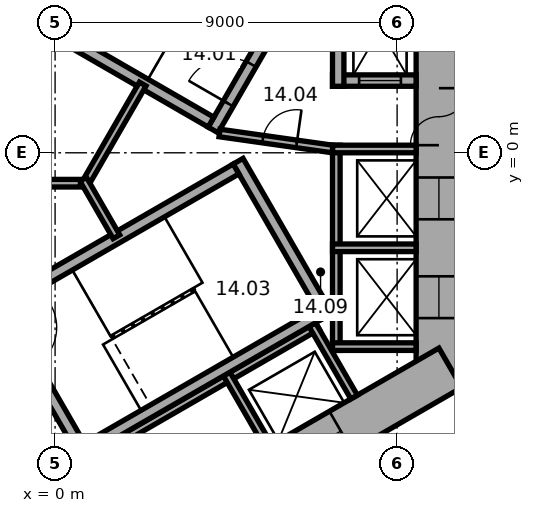
"""IFC4 building model, lengths in metres.
Left out: names, types, materials, properties, quantities, classifications, styles, units other than length and angle.
Written with IfcOpenShell. Run it as: python <this file> out.ifc"""

import sys

from ifc_helpers import new_model, si_unit, direction, frame, frame_2d, origin, place, context, subcontext, project, spatial, rectangle, extrude, element, fill, save


model = new_model("IFC4")
c1 = context("Model", 3, precision=1e-05, world=origin(), true_north=direction((0.0, 1.0)))
c2 = subcontext(c1, "Body", "Model", "MODEL_VIEW")
j1 = project(units=[si_unit("LENGTHUNIT", "METRE"), si_unit("PLANEANGLEUNIT", "RADIAN")], contexts=[c1])
p1 = place(None, origin())
s1 = spatial("IfcSite", under=j1, at=p1, CompositionType="ELEMENT")
p2 = place(p1, origin())
s2 = spatial("IfcBuilding", under=s1, at=p2, CompositionType="ELEMENT")
p3 = place(p2, frame((0.0, 0.0, 67.1)))
s3 = spatial("IfcBuildingStorey", under=s2, at=p3, CompositionType="ELEMENT", Elevation=67.1)
p4 = place(p3, frame((10.1, -6.177, 0.0), z_axis=(0.0, 0.0, 1.0), x_axis=(0.0, 1.0, 0.0)))
e1 = element("IfcWall", 1, at=p4, inside=s3, PredefinedType="SHEAR", context=c2, shape_type="SweptSolid", body=[
    extrude(rectangle(XDim=12.355, YDim=1.2, at=frame_2d((6.177, 0.0))), origin(), (0.0, 0.0, 1.0), 3.3),
])
p5 = place(p4, frame((6.378, 0.0, 0.0)))
e2 = element("IfcOpeningElement", 2, at=p5, cuts=e1, PredefinedType="OPENING", context=c2, shape_type="SweptSolid", body=[
    extrude(rectangle(XDim=1.5, YDim=2.1, at=frame_2d((0.75, 1.05))), frame((0.0, 0.61, 0.0), z_axis=(0.0, -1.0, 0.0), x_axis=(1.0, 0.0, 0.0)), (0.0, 0.0, 1.0), 1.22),
])
p6 = place(p4, frame((1.828, 0.0, 0.0)))
e3 = element("IfcOpeningElement", 3, at=p6, cuts=e1, PredefinedType="OPENING", context=c2, shape_type="SweptSolid", body=[
    extrude(rectangle(XDim=1.1, YDim=2.1, at=frame_2d((0.55, 1.05))), frame((0.0, 0.61, 0.0), z_axis=(0.0, -1.0, 0.0), x_axis=(1.0, 0.0, 0.0)), (0.0, 0.0, 1.0), 1.22),
])
p7 = place(p4, frame((4.427, 0.0, 0.0)))
e4 = element("IfcOpeningElement", 4, at=p7, cuts=e1, PredefinedType="OPENING", context=c2, shape_type="SweptSolid", body=[
    extrude(rectangle(XDim=1.1, YDim=2.1, at=frame_2d((0.55, 1.05))), frame((0.0, 0.61, 0.0), z_axis=(0.0, -1.0, 0.0), x_axis=(1.0, 0.0, 0.0)), (0.0, 0.0, 1.0), 1.22),
])
p8 = place(p3, frame((-10.4, -5.658, 0.0), z_axis=(0.0, 0.0, 1.0), x_axis=(0.866021384402, -0.500006961711, 0.0)))
e5 = element("IfcWall", 5, at=p8, inside=s3, PredefinedType="SHEAR", context=c2, shape_type="SweptSolid", body=[
    extrude(rectangle(XDim=12.355, YDim=1.2, at=frame_2d((6.178, 0.0))), origin(), (0.0, 0.0, 1.0), 3.3),
])
p9 = place(p8, frame((6.378, 0.0, 0.0)))
e6 = element("IfcOpeningElement", 6, at=p9, cuts=e5, PredefinedType="OPENING", context=c2, shape_type="SweptSolid", body=[
    extrude(rectangle(XDim=1.5, YDim=2.1, at=frame_2d((0.75, 1.05))), frame((0.0, 0.61, 0.0), z_axis=(0.0, -1.0, 0.0), x_axis=(1.0, 0.0, 0.0)), (0.0, 0.0, 1.0), 1.22),
])
p10 = place(p8, frame((3.228, 0.0, 0.0)))
e7 = element("IfcOpeningElement", 7, at=p10, cuts=e5, PredefinedType="OPENING", context=c2, shape_type="SweptSolid", body=[
    extrude(rectangle(XDim=0.9, YDim=2.1, at=frame_2d((0.45, 1.05))), frame((0.0, 0.61, 0.0), z_axis=(0.0, -1.0, 0.0), x_axis=(1.0, 0.0, 0.0)), (0.0, 0.0, 1.0), 1.22),
])
p11 = place(p3, frame((-0.3, -11.836, 0.0), z_axis=(0.0, 0.0, 1.0), x_axis=(0.866021384402, 0.500006961711, 0.0)))
e8 = element("IfcWall", 8, at=p11, inside=s3, PredefinedType="SHEAR", context=c2, shape_type="SweptSolid", body=[
    extrude(rectangle(XDim=12.355, YDim=1.2, at=frame_2d((6.178, 0.0))), origin(), (0.0, 0.0, 1.0), 3.3),
])
p12 = place(p11, frame((4.128, 0.0, 0.0)))
e9 = element("IfcOpeningElement", 9, at=p12, cuts=e8, PredefinedType="OPENING", context=c2, shape_type="SweptSolid", body=[
    extrude(rectangle(XDim=0.9, YDim=2.1, at=frame_2d((0.45, 1.05))), frame((0.0, 0.61, 0.0), z_axis=(0.0, -1.0, 0.0), x_axis=(1.0, 0.0, 0.0)), (0.0, 0.0, 1.0), 1.22),
])
p13 = place(p11, frame((7.928, 0.0, 0.0)))
e10 = element("IfcOpeningElement", 10, at=p13, cuts=e8, PredefinedType="OPENING", context=c2, shape_type="SweptSolid", body=[
    extrude(rectangle(XDim=1.1, YDim=2.1, at=frame_2d((0.55, 1.05))), frame((0.0, 0.61, 0.0), z_axis=(0.0, -1.0, 0.0), x_axis=(1.0, 0.0, 0.0)), (0.0, 0.0, 1.0), 1.22),
])
p14 = place(p3, frame((7.4, -5.2, 0.0), z_axis=(0.0, 0.0, 1.0), x_axis=(0.0, 1.0, 0.0)))
e11 = element("IfcWall", 11, at=p14, inside=s3, PredefinedType="PARTITIONING", context=c2, shape_type="SweptSolid", body=[
    extrude(rectangle(XDim=5.4, YDim=0.2, at=frame_2d((2.7, 0.0))), origin(), (0.0, 0.0, 1.0), 3.05),
])
for number, where, z_axis, x_axis in (
    (12, (7.3, -5.1, 0.0), (0.0, 0.0, 1.0), (1.0, 0.0, 0.0)),
    (13, (7.3, -2.5, 0.0), (0.0, 0.0, 1.0), (1.0, 0.0, 0.0)),
    (14, (7.3, 0.1, 0.0), (0.0, 0.0, 1.0), (1.0, 0.0, 0.0)),
):
    element("IfcWall", number, at=place(p3, frame(where, z_axis=z_axis, x_axis=x_axis)), inside=s3, PredefinedType="PARTITIONING", context=c2, shape_type="SweptSolid", body=[
        extrude(rectangle(XDim=2.2, YDim=0.2, at=frame_2d((1.1, 0.0))), origin(), (0.0, 0.0, 1.0), 3.05),
    ])
p15 = place(p3, frame((-0.024, -8.559, 0.0), z_axis=(0.0, 0.0, 1.0), x_axis=(0.866026010844, 0.49999894854, 0.0)))
e15 = element("IfcWall", 15, at=p15, inside=s3, PredefinedType="PARTITIONING", context=c2, shape_type="SweptSolid", body=[
    extrude(rectangle(XDim=8.0, YDim=0.2, at=frame_2d((4.0, 0.0))), origin(), (0.0, 0.0, 1.0), 3.05),
])
for number, where, z_axis, x_axis in (
    (16, (4.516, -5.822, 0.0), (0.0, 0.0, 1.0), (0.5, -0.866, 0.0)),
    (17, (6.768, -4.522, 0.0), (0.0, 0.0, 1.0), (0.5, -0.866, 0.0)),
):
    element("IfcWall", number, at=place(p3, frame(where, z_axis=z_axis, x_axis=x_axis)), inside=s3, PredefinedType="PARTITIONING", context=c2, shape_type="SweptSolid", body=[
        extrude(rectangle(XDim=2.2, YDim=0.2, at=frame_2d((1.1, 0.0))), origin(), (0.0, 0.0, 1.0), 3.05),
    ])
p16 = place(p3, frame((4.158, 0.602, 0.0), z_axis=(0.0, 0.0, 1.0), x_axis=(0.499977259774, 0.866038532462, 0.0)))
e18 = element("IfcWall", 18, at=p16, inside=s3, PredefinedType="SHEAR", context=c2, shape_type="SweptSolid", body=[
    extrude(rectangle(XDim=4.7, YDim=0.3, at=frame_2d((2.35, 0.0))), origin(), (0.0, 0.0, 1.0), 3.05),
])
p17 = place(p16, frame((0.8, 0.0, 0.0)))
e19 = element("IfcOpeningElement", 19, at=p17, cuts=e18, PredefinedType="OPENING", context=c2, shape_type="SweptSolid", body=[
    extrude(rectangle(XDim=1.2, YDim=2.1, at=frame_2d((0.6, 1.05))), frame((0.0, 0.16, 0.0), z_axis=(0.0, -1.0, 0.0), x_axis=(1.0, 0.0, 0.0)), (0.0, 0.0, 1.0), 0.32),
])
p18 = place(p3, frame((4.103, 0.807, 0.0), z_axis=(0.0, 0.0, 1.0), x_axis=(-0.866027801685, 0.499995846692, 0.0)))
e20 = element("IfcWall", 20, at=p18, inside=s3, PredefinedType="SHEAR", context=c2, shape_type="SweptSolid", body=[
    extrude(rectangle(XDim=7.06, YDim=0.3, at=frame_2d((3.53, 0.0))), origin(), (0.0, 0.0, 1.0), 3.05),
])
p19 = place(p3, frame((-1.558, -3.902, 0.0), z_axis=(0.0, 0.0, 1.0), x_axis=(0.499977259774, -0.866038532462, 0.0)))
e21 = element("IfcWall", 21, at=p19, inside=s3, PredefinedType="SHEAR", context=c2, shape_type="SweptSolid", body=[
    extrude(rectangle(XDim=4.7, YDim=0.3, at=frame_2d((2.35, 0.0))), origin(), (0.0, 0.0, 1.0), 3.05),
])
p20 = place(p19, frame((0.8, 0.0, 0.0)))
e22 = element("IfcOpeningElement", 22, at=p20, cuts=e21, PredefinedType="OPENING", context=c2, shape_type="SweptSolid", body=[
    extrude(rectangle(XDim=1.2, YDim=2.1, at=frame_2d((0.6, 1.05))), frame((0.0, 0.16, 0.0), z_axis=(0.0, -1.0, 0.0), x_axis=(1.0, 0.0, 0.0)), (0.0, 0.0, 1.0), 0.32),
])
p21 = place(p3, frame((4.816, -0.222, 0.0), z_axis=(0.0, 0.0, 1.0), x_axis=(0.499977259774, -0.866038532462, 0.0)))
e23 = element("IfcWall", 23, at=p21, inside=s3, PredefinedType="SHEAR", context=c2, shape_type="SweptSolid", body=[
    extrude(rectangle(XDim=4.7, YDim=0.3, at=frame_2d((2.35, 0.0))), origin(), (0.0, 0.0, 1.0), 3.05),
])
for number, where, z_axis, x_axis in (
    (24, (-1.353, -3.957, 0.0), (0.0, 0.0, 1.0), (0.866, 0.5, 0.0)),
    (25, (0.847, -7.767, 0.0), (0.0, 0.0, 1.0), (0.866, 0.5, 0.0)),
):
    element("IfcWall", number, at=place(p3, frame(where, z_axis=z_axis, x_axis=x_axis)), inside=s3, PredefinedType="SHEAR", context=c2, shape_type="SweptSolid", body=[
        extrude(rectangle(XDim=7.06, YDim=0.3, at=frame_2d((3.53, 0.0))), origin(), (0.0, 0.0, 1.0), 3.05),
    ])
p22 = place(p3, frame((7.3, 1.9, 0.0), z_axis=(0.0, 0.0, 1.0), x_axis=(1.0, 0.0, 0.0)))
e26 = element("IfcWall", 26, at=p22, inside=s3, PredefinedType="SHEAR", context=c2, shape_type="SweptSolid", body=[
    extrude(rectangle(XDim=2.2, YDim=0.3, at=frame_2d((1.1, 0.0))), origin(), (0.0, 0.0, 1.0), 3.05),
])
p23 = place(p22, frame((0.7, 0.0, 0.0)))
e27 = element("IfcOpeningElement", 27, at=p23, cuts=e26, PredefinedType="OPENING", context=c2, shape_type="SweptSolid", body=[
    extrude(rectangle(XDim=1.1, YDim=2.1, at=frame_2d((0.55, 1.05))), frame((0.0, 0.16, 0.0), z_axis=(0.0, -1.0, 0.0), x_axis=(1.0, 0.0, 0.0)), (0.0, 0.0, 1.0), 0.32),
])
p24 = place(p3, frame((7.45, 1.75, 0.0), z_axis=(0.0, 0.0, 1.0), x_axis=(0.0, 1.0, 0.0)))
e28 = element("IfcWall", 28, at=p24, inside=s3, PredefinedType="SHEAR", context=c2, shape_type="SweptSolid", body=[
    extrude(rectangle(XDim=3.35, YDim=0.3, at=frame_2d((1.675, 0.0))), origin(), (0.0, 0.0, 1.0), 3.05),
])
p25 = place(p3, frame((4.327, 0.521, 0.0), z_axis=(0.0, 0.0, 1.0), x_axis=(0.990124376366, -0.14019172346, 0.0)))
e29 = element("IfcWall", 29, at=p25, inside=s3, PredefinedType="PARTITIONING", context=c2, shape_type="SweptSolid", body=[
    extrude(rectangle(XDim=3.002, YDim=0.2, at=frame_2d((1.501, 0.0))), origin(), (0.0, 0.0, 1.0), 3.05),
])
p26 = place(p25, frame((1.15, 0.0, 0.0)))
e30 = element("IfcOpeningElement", 30, at=p26, cuts=e29, PredefinedType="OPENING", context=c2, shape_type="SweptSolid", body=[
    extrude(rectangle(XDim=0.9, YDim=2.1, at=frame_2d((0.45, 1.05))), frame((0.0, 0.11, 0.0), z_axis=(0.0, -1.0, 0.0), x_axis=(1.0, 0.0, 0.0)), (0.0, 0.0, 1.0), 0.22),
])
p27 = place(p3, frame((0.92, -0.8, 0.0), z_axis=(0.0, 0.0, 1.0), x_axis=(-1.0, 0.0, 0.0)))
e31 = element("IfcWall", 31, at=p27, inside=s3, PredefinedType="PARTITIONING", context=c2, shape_type="SweptSolid", body=[
    extrude(rectangle(XDim=3.64, YDim=0.2, at=frame_2d((1.82, 0.0))), origin(), (0.0, 0.0, 1.0), 3.05),
])
p28 = place(p3, frame((0.74, -0.904, 0.0), z_axis=(0.0, 0.0, 1.0), x_axis=(0.500028278809, 0.866009076391, 0.0)))
e32 = element("IfcWall", 32, at=p28, inside=s3, PredefinedType="PARTITIONING", context=c2, shape_type="SweptSolid", body=[
    extrude(rectangle(XDim=3.133, YDim=0.2, at=frame_2d((1.566, 0.0))), origin(), (0.0, 0.0, 1.0), 3.05),
])
p29 = place(p3, frame((0.74, -0.696, 0.0), z_axis=(0.0, 0.0, 1.0), x_axis=(0.499956301907, -0.86605063142, 0.0)))
e33 = element("IfcWall", 33, at=p29, inside=s3, PredefinedType="PARTITIONING", context=c2, shape_type="SweptSolid", body=[
    extrude(rectangle(XDim=1.747, YDim=0.2, at=frame_2d((0.874, 0.0))), origin(), (0.0, 0.0, 1.0), 3.05),
])
p30 = place(p5, origin())
e34 = element("IfcDoor", 34, at=p30, inside=s3, OperationType="DOUBLE_DOOR_SINGLE_SWING", PredefinedType="DOOR", context=c2, shape_type="SweptSolid", body=[
    extrude(rectangle(XDim=1.5, YDim=2.1, at=frame_2d((0.75, 1.05))), frame((0.0, 0.025, 0.0), z_axis=(0.0, -1.0, 0.0), x_axis=(1.0, 0.0, 0.0)), (0.0, 0.0, 1.0), 0.05),
])
fill(e2, e34)
p31 = place(p17, origin())
e35 = element("IfcDoor", 35, at=p31, inside=s3, OperationType="SINGLE_SWING_RIGHT", PredefinedType="DOOR", context=c2, shape_type="SweptSolid", body=[
    extrude(rectangle(XDim=1.2, YDim=2.1, at=frame_2d((0.6, 1.05))), frame((0.0, 0.025, 0.0), z_axis=(0.0, -1.0, 0.0), x_axis=(1.0, 0.0, 0.0)), (0.0, 0.0, 1.0), 0.05),
])
fill(e19, e35)
p32 = place(p26, origin())
e36 = element("IfcDoor", 36, at=p32, inside=s3, OperationType="SINGLE_SWING_LEFT", PredefinedType="DOOR", context=c2, shape_type="SweptSolid", body=[
    extrude(rectangle(XDim=0.9, YDim=2.1, at=frame_2d((0.45, 1.05))), frame((0.0, 0.025, 0.0), z_axis=(0.0, -1.0, 0.0), x_axis=(1.0, 0.0, 0.0)), (0.0, 0.0, 1.0), 0.05),
])
fill(e30, e36)
p33 = place(p23, origin())
e37 = element("IfcDoor", 37, at=p33, inside=s3, OperationType="DOUBLE_DOOR_SLIDING", PredefinedType="DOOR", context=c2, shape_type="SweptSolid", body=[
    extrude(rectangle(XDim=1.1, YDim=2.1, at=frame_2d((0.55, 1.05))), frame((0.0, 0.025, 0.0), z_axis=(0.0, -1.0, 0.0), x_axis=(1.0, 0.0, 0.0)), (0.0, 0.0, 1.0), 0.05),
])
fill(e27, e37)
p34 = place(p6, origin())
e38 = element("IfcDoor", 38, at=p34, inside=s3, OperationType="DOUBLE_DOOR_SLIDING", PredefinedType="DOOR", context=c2, shape_type="SweptSolid", body=[
    extrude(rectangle(XDim=1.1, YDim=2.1, at=frame_2d((0.55, 1.05))), frame((0.0, 0.025, 0.0), z_axis=(0.0, -1.0, 0.0), x_axis=(1.0, 0.0, 0.0)), (0.0, 0.0, 1.0), 0.05),
])
fill(e3, e38)
p35 = place(p7, origin())
e39 = element("IfcDoor", 39, at=p35, inside=s3, OperationType="DOUBLE_DOOR_SLIDING", PredefinedType="DOOR", context=c2, shape_type="SweptSolid", body=[
    extrude(rectangle(XDim=1.1, YDim=2.1, at=frame_2d((0.55, 1.05))), frame((0.0, 0.025, 0.0), z_axis=(0.0, -1.0, 0.0), x_axis=(1.0, 0.0, 0.0)), (0.0, 0.0, 1.0), 0.05),
])
fill(e4, e39)
p36 = place(p13, origin())
e40 = element("IfcDoor", 40, at=p36, inside=s3, OperationType="DOUBLE_DOOR_SLIDING", PredefinedType="DOOR", context=c2, shape_type="SweptSolid", body=[
    extrude(rectangle(XDim=1.1, YDim=2.1, at=frame_2d((0.55, 1.05))), frame((0.0, 0.025, 0.0), z_axis=(0.0, -1.0, 0.0), x_axis=(1.0, 0.0, 0.0)), (0.0, 0.0, 1.0), 0.05),
])
fill(e10, e40)
save(model, sys.argv[1])
